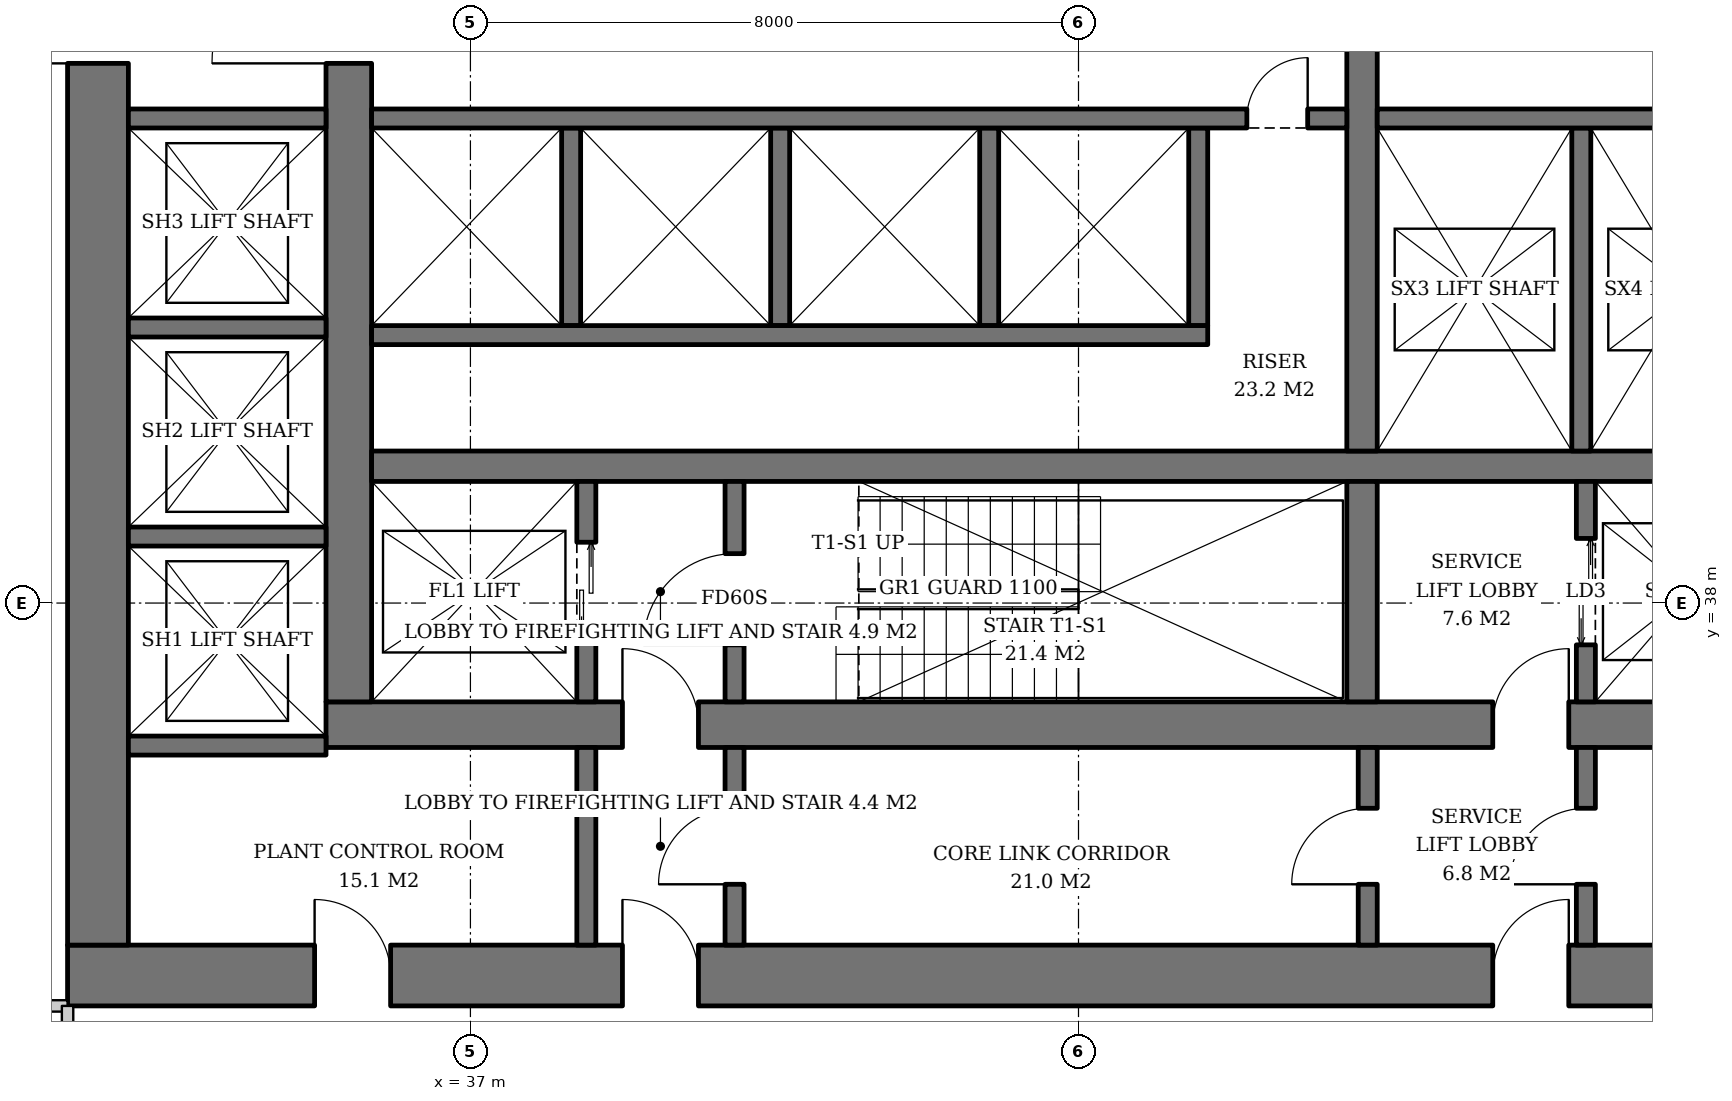
"""IFC4 building model, lengths in metres.
Left out: names, types, materials, properties, quantities, classifications, styles, units other than length and angle.
Written with IfcOpenShell. Run it as: python <this file> out.ifc"""

import sys

from ifc_helpers import new_model, si_unit, direction, frame, frame_2d, origin, place, context, subcontext, project, spatial, rectangle, extrude, element, fill, save


model = new_model("IFC4")
c1 = context("Model", 3, precision=1e-05, world=origin(), true_north=direction((0.0, 1.0)))
c2 = subcontext(c1, "Body", "Model", "MODEL_VIEW")
j1 = project(units=[si_unit("LENGTHUNIT", "METRE"), si_unit("PLANEANGLEUNIT", "RADIAN")], contexts=[c1])
p1 = place(None, origin())
s1 = spatial("IfcSite", under=j1, at=p1, CompositionType="ELEMENT")
p2 = place(p1, origin())
s2 = spatial("IfcBuilding", under=s1, at=p2, CompositionType="ELEMENT")
p3 = place(p2, frame((0.0, 0.0, 81.8)))
s3 = spatial("IfcBuildingStorey", under=s2, at=p3, CompositionType="ELEMENT", Elevation=81.8)
p4 = place(p3, frame((35.1, 36.4, 0.0), z_axis=(0.0, 0.0, 1.0), x_axis=(1.0, 0.0, 0.0)))
e1 = element("IfcWall", 1, at=p4, inside=s3, PredefinedType="SHEAR", context=c2, shape_type="SweptSolid", body=[
    extrude(rectangle(XDim=19.8, YDim=0.6, at=frame_2d((9.9, 0.0))), origin(), (0.0, 0.0, 1.0), 3.8),
])
p5 = place(p4, frame((3.9, 0.0, 0.0)))
e2 = element("IfcOpeningElement", 2, at=p5, cuts=e1, PredefinedType="OPENING", context=c2, shape_type="SweptSolid", body=[
    extrude(rectangle(XDim=1.0, YDim=2.1, at=frame_2d((0.5, 1.05))), frame((0.0, 0.31, 0.0), z_axis=(0.0, -1.0, 0.0), x_axis=(1.0, 0.0, 0.0)), (0.0, 0.0, 1.0), 0.62),
])
p6 = place(p4, frame((15.35, 0.0, 0.0)))
e3 = element("IfcOpeningElement", 3, at=p6, cuts=e1, PredefinedType="OPENING", context=c2, shape_type="SweptSolid", body=[
    extrude(rectangle(XDim=1.0, YDim=2.1, at=frame_2d((0.5, 1.05))), frame((0.0, 0.31, 0.0), z_axis=(0.0, -1.0, 0.0), x_axis=(1.0, 0.0, 0.0)), (0.0, 0.0, 1.0), 0.62),
])
p7 = place(p3, frame((35.4, 36.7, 0.0), z_axis=(0.0, 0.0, 1.0), x_axis=(0.0, 1.0, 0.0)))
e4 = element("IfcWall", 4, at=p7, inside=s3, PredefinedType="SHEAR", context=c2, shape_type="SweptSolid", body=[
    extrude(rectangle(XDim=18.6, YDim=0.6, at=frame_2d((9.3, 0.0))), origin(), (0.0, 0.0, 1.0), 3.8),
])
p8 = place(p7, frame((8.4, 0.0, 0.0)))
e5 = element("IfcOpeningElement", 5, at=p8, cuts=e4, PredefinedType="OPENING", context=c2, shape_type="SweptSolid", body=[
    extrude(rectangle(XDim=1.8, YDim=2.4, at=frame_2d((0.9, 1.2))), frame((0.0, 0.31, 0.0), z_axis=(0.0, -1.0, 0.0), x_axis=(1.0, 0.0, 0.0)), (0.0, 0.0, 1.0), 0.62),
])
p9 = place(p3, frame((31.7, 33.1, 0.0), z_axis=(0.0, 0.0, 1.0), x_axis=(1.0, 0.0, 0.0)))
e6 = element("IfcWall", 6, at=p9, inside=s3, PredefinedType="SHEAR", context=c2, shape_type="SweptSolid", body=[
    extrude(rectangle(XDim=26.6, YDim=0.8, at=frame_2d((13.3, 0.0))), origin(), (0.0, 0.0, 1.0), 3.8),
])
p10 = place(p9, frame((7.3, 0.0, 0.0)))
e7 = element("IfcOpeningElement", 7, at=p10, cuts=e6, PredefinedType="OPENING", context=c2, shape_type="SweptSolid", body=[
    extrude(rectangle(XDim=1.0, YDim=2.1, at=frame_2d((0.5, 1.05))), frame((0.0, 0.41, 0.0), z_axis=(0.0, -1.0, 0.0), x_axis=(1.0, 0.0, 0.0)), (0.0, 0.0, 1.0), 0.82),
])
p11 = place(p9, frame((18.75, 0.0, 0.0)))
e8 = element("IfcOpeningElement", 8, at=p11, cuts=e6, PredefinedType="OPENING", context=c2, shape_type="SweptSolid", body=[
    extrude(rectangle(XDim=1.0, YDim=2.1, at=frame_2d((0.5, 1.05))), frame((0.0, 0.41, 0.0), z_axis=(0.0, -1.0, 0.0), x_axis=(1.0, 0.0, 0.0)), (0.0, 0.0, 1.0), 0.82),
])
p12 = place(p9, frame((3.25, 0.0, 0.0)))
e9 = element("IfcOpeningElement", 9, at=p12, cuts=e6, PredefinedType="OPENING", context=c2, shape_type="SweptSolid", body=[
    extrude(rectangle(XDim=1.0, YDim=2.1, at=frame_2d((0.5, 1.05))), frame((0.0, 0.41, 0.0), z_axis=(0.0, -1.0, 0.0), x_axis=(1.0, 0.0, 0.0)), (0.0, 0.0, 1.0), 0.82),
])
p13 = place(p3, frame((32.1, 33.5, 0.0), z_axis=(0.0, 0.0, 1.0), x_axis=(0.0, 1.0, 0.0)))
e10 = element("IfcWall", 10, at=p13, inside=s3, PredefinedType="SHEAR", context=c2, shape_type="SweptSolid", body=[
    extrude(rectangle(XDim=25.0, YDim=0.8, at=frame_2d((12.5, 0.0))), origin(), (0.0, 0.0, 1.0), 3.8),
])
p14 = place(p13, frame((11.6, 0.0, 0.0)))
e11 = element("IfcOpeningElement", 11, at=p14, cuts=e10, PredefinedType="OPENING", context=c2, shape_type="SweptSolid", body=[
    extrude(rectangle(XDim=1.8, YDim=2.4, at=frame_2d((0.9, 1.2))), frame((0.0, 0.41, 0.0), z_axis=(0.0, -1.0, 0.0), x_axis=(1.0, 0.0, 0.0)), (0.0, 0.0, 1.0), 0.82),
])
p15 = place(p3, frame((35.7, 39.8, 0.0), z_axis=(0.0, 0.0, 1.0), x_axis=(1.0, 0.0, 0.0)))
e12 = element("IfcWall", 12, at=p15, inside=s3, PredefinedType="SHEAR", context=c2, shape_type="SweptSolid", body=[
    extrude(rectangle(XDim=18.6, YDim=0.4, at=frame_2d((9.3, 0.0))), origin(), (0.0, 0.0, 1.0), 3.8),
])
p16 = place(p3, frame((48.73, 36.7, 0.0), z_axis=(0.0, 0.0, 1.0), x_axis=(0.0, 1.0, 0.0)))
e13 = element("IfcWall", 13, at=p16, inside=s3, PredefinedType="SHEAR", context=c2, shape_type="SweptSolid", body=[
    extrude(rectangle(XDim=2.9, YDim=0.4, at=frame_2d((1.45, 0.0))), origin(), (0.0, 0.0, 1.0), 3.8),
])
p17 = place(p3, frame((48.73, 40.0, 0.0), z_axis=(0.0, 0.0, 1.0), x_axis=(0.0, 1.0, 0.0)))
e14 = element("IfcWall", 14, at=p17, inside=s3, PredefinedType="SHEAR", context=c2, shape_type="SweptSolid", body=[
    extrude(rectangle(XDim=12.0, YDim=0.4, at=frame_2d((6.0, 0.0))), origin(), (0.0, 0.0, 1.0), 3.8),
])
p18 = place(p17, frame((5.5, 0.0, 0.0)))
e15 = element("IfcOpeningElement", 15, at=p18, cuts=e14, PredefinedType="OPENING", context=c2, shape_type="SweptSolid", body=[
    extrude(rectangle(XDim=1.0, YDim=2.1, at=frame_2d((0.5, 1.05))), frame((0.0, 0.21, 0.0), z_axis=(0.0, -1.0, 0.0), x_axis=(1.0, 0.0, 0.0)), (0.0, 0.0, 1.0), 0.42),
])
p19 = place(p3, frame((38.525, 36.7, 0.0), z_axis=(0.0, 0.0, 1.0), x_axis=(0.0, 1.0, 0.0)))
e16 = element("IfcWall", 16, at=p19, inside=s3, PredefinedType="SHEAR", context=c2, shape_type="SweptSolid", body=[
    extrude(rectangle(XDim=2.9, YDim=0.25, at=frame_2d((1.45, 0.0))), origin(), (0.0, 0.0, 1.0), 3.8),
])
p20 = place(p19, frame((0.8, 0.0, 0.0)))
e17 = element("IfcOpeningElement", 17, at=p20, cuts=e16, PredefinedType="OPENING", context=c2, shape_type="SweptSolid", body=[
    extrude(rectangle(XDim=1.3, YDim=2.2, at=frame_2d((0.65, 1.1))), frame((0.0, 0.135, 0.0), z_axis=(0.0, -1.0, 0.0), x_axis=(1.0, 0.0, 0.0)), (0.0, 0.0, 1.0), 0.27),
])
p21 = place(p3, frame((40.475, 36.7, 0.0), z_axis=(0.0, 0.0, 1.0), x_axis=(0.0, 1.0, 0.0)))
e18 = element("IfcWall", 18, at=p21, inside=s3, PredefinedType="SHEAR", context=c2, shape_type="SweptSolid", body=[
    extrude(rectangle(XDim=2.9, YDim=0.25, at=frame_2d((1.45, 0.0))), origin(), (0.0, 0.0, 1.0), 3.8),
])
p22 = place(p21, frame((0.75, 0.0, 0.0)))
e19 = element("IfcOpeningElement", 19, at=p22, cuts=e18, PredefinedType="OPENING", context=c2, shape_type="SweptSolid", body=[
    extrude(rectangle(XDim=1.2, YDim=2.1, at=frame_2d((0.6, 1.05))), frame((0.0, 0.135, 0.0), z_axis=(0.0, -1.0, 0.0), x_axis=(1.0, 0.0, 0.0)), (0.0, 0.0, 1.0), 0.27),
])
p23 = place(p3, frame((51.675, 36.7, 0.0), z_axis=(0.0, 0.0, 1.0), x_axis=(0.0, 1.0, 0.0)))
e20 = element("IfcWall", 20, at=p23, inside=s3, PredefinedType="SHEAR", context=c2, shape_type="SweptSolid", body=[
    extrude(rectangle(XDim=2.9, YDim=0.25, at=frame_2d((1.45, 0.0))), origin(), (0.0, 0.0, 1.0), 3.8),
])
p24 = place(p23, frame((0.75, 0.0, 0.0)))
e21 = element("IfcOpeningElement", 21, at=p24, cuts=e20, PredefinedType="OPENING", context=c2, shape_type="SweptSolid", body=[
    extrude(rectangle(XDim=1.4, YDim=2.4, at=frame_2d((0.7, 1.2))), frame((0.0, 0.135, 0.0), z_axis=(0.0, -1.0, 0.0), x_axis=(1.0, 0.0, 0.0)), (0.0, 0.0, 1.0), 0.27),
])
for number, where, z_axis, x_axis in (
    (22, (38.325, 44.25, 0.0), (0.0, 0.0, 1.0), (0.0, -1.0, 0.0)),
    (23, (41.075, 44.25, 0.0), (0.0, 0.0, 1.0), (0.0, -1.0, 0.0)),
    (24, (43.825, 44.25, 0.0), (0.0, 0.0, 1.0), (0.0, -1.0, 0.0)),
    (25, (46.575, 44.25, 0.0), (0.0, 0.0, 1.0), (0.0, -1.0, 0.0)),
):
    element("IfcWall", number, at=place(p3, frame(where, z_axis=z_axis, x_axis=x_axis)), inside=s3, PredefinedType="SHEAR", context=c2, shape_type="SweptSolid", body=[
        extrude(rectangle(XDim=2.6, YDim=0.25, at=frame_2d((1.3, 0.0))), origin(), (0.0, 0.0, 1.0), 3.8),
    ])
p25 = place(p3, frame((35.7, 41.525, 0.0), z_axis=(0.0, 0.0, 1.0), x_axis=(1.0, 0.0, 0.0)))
e26 = element("IfcWall", 26, at=p25, inside=s3, PredefinedType="SHEAR", context=c2, shape_type="SweptSolid", body=[
    extrude(rectangle(XDim=11.0, YDim=0.25, at=frame_2d((5.5, 0.0))), origin(), (0.0, 0.0, 1.0), 3.8),
])
p26 = place(p3, frame((35.7, 44.375, 0.0), z_axis=(0.0, 0.0, 1.0), x_axis=(1.0, 0.0, 0.0)))
e27 = element("IfcWall", 27, at=p26, inside=s3, PredefinedType="SHEAR", context=c2, shape_type="SweptSolid", body=[
    extrude(rectangle(XDim=12.83, YDim=0.25, at=frame_2d((6.415, 0.0))), origin(), (0.0, 0.0, 1.0), 3.8),
])
p27 = place(p26, frame((11.515, 0.0, 0.0)))
e28 = element("IfcOpeningElement", 28, at=p27, cuts=e27, PredefinedType="OPENING", context=c2, shape_type="SweptSolid", body=[
    extrude(rectangle(XDim=0.8, YDim=2.0, at=frame_2d((0.4, 1.0))), frame((0.0, 0.135, 0.0), z_axis=(0.0, -1.0, 0.0), x_axis=(1.0, 0.0, 0.0)), (0.0, 0.0, 1.0), 0.27),
])
p28 = place(p3, frame((51.615, 44.25, 0.0), z_axis=(0.0, 0.0, 1.0), x_axis=(0.0, -1.0, 0.0)))
e29 = element("IfcWall", 29, at=p28, inside=s3, PredefinedType="SHEAR", context=c2, shape_type="SweptSolid", body=[
    extrude(rectangle(XDim=4.25, YDim=0.25, at=frame_2d((2.125, 0.0))), origin(), (0.0, 0.0, 1.0), 3.8),
])
p29 = place(p3, frame((48.93, 44.375, 0.0), z_axis=(0.0, 0.0, 1.0), x_axis=(1.0, 0.0, 0.0)))
e30 = element("IfcWall", 30, at=p29, inside=s3, PredefinedType="SHEAR", context=c2, shape_type="SweptSolid", body=[
    extrude(rectangle(XDim=5.37, YDim=0.25, at=frame_2d((2.685, 0.0))), origin(), (0.0, 0.0, 1.0), 3.8),
])
for number, where, z_axis, x_axis in (
    (31, (32.5, 36.125, 0.0), (0.0, 0.0, 1.0), (1.0, 0.0, 0.0)),
    (32, (32.5, 38.875, 0.0), (0.0, 0.0, 1.0), (1.0, 0.0, 0.0)),
    (33, (32.5, 41.625, 0.0), (0.0, 0.0, 1.0), (1.0, 0.0, 0.0)),
    (34, (32.5, 44.375, 0.0), (0.0, 0.0, 1.0), (1.0, 0.0, 0.0)),
):
    element("IfcWall", number, at=place(p3, frame(where, z_axis=z_axis, x_axis=x_axis)), inside=s3, PredefinedType="SHEAR", context=c2, shape_type="SweptSolid", body=[
        extrude(rectangle(XDim=2.6, YDim=0.25, at=frame_2d((1.3, 0.0))), origin(), (0.0, 0.0, 1.0), 3.8),
    ])
p30 = place(p3, frame((38.525, 33.5, 0.0), z_axis=(0.0, 0.0, 1.0), x_axis=(0.0, 1.0, 0.0)))
e35 = element("IfcWall", 35, at=p30, inside=s3, PredefinedType="SOLIDWALL", context=c2, shape_type="SweptSolid", body=[
    extrude(rectangle(XDim=2.6, YDim=0.25, at=frame_2d((1.3, 0.0))), origin(), (0.0, 0.0, 1.0), 3.52),
])
p31 = place(p3, frame((40.475, 33.5, 0.0), z_axis=(0.0, 0.0, 1.0), x_axis=(0.0, 1.0, 0.0)))
e36 = element("IfcWall", 36, at=p31, inside=s3, PredefinedType="SOLIDWALL", context=c2, shape_type="SweptSolid", body=[
    extrude(rectangle(XDim=2.6, YDim=0.25, at=frame_2d((1.3, 0.0))), origin(), (0.0, 0.0, 1.0), 3.52),
])
p32 = place(p31, frame((0.8, 0.0, 0.0)))
e37 = element("IfcOpeningElement", 37, at=p32, cuts=e36, PredefinedType="OPENING", context=c2, shape_type="SweptSolid", body=[
    extrude(rectangle(XDim=1.0, YDim=2.1, at=frame_2d((0.5, 1.05))), frame((0.0, 0.135, 0.0), z_axis=(0.0, -1.0, 0.0), x_axis=(1.0, 0.0, 0.0)), (0.0, 0.0, 1.0), 0.27),
])
p33 = place(p3, frame((48.805, 33.5, 0.0), z_axis=(0.0, 0.0, 1.0), x_axis=(0.0, 1.0, 0.0)))
e38 = element("IfcWall", 38, at=p33, inside=s3, PredefinedType="SOLIDWALL", context=c2, shape_type="SweptSolid", body=[
    extrude(rectangle(XDim=2.6, YDim=0.25, at=frame_2d((1.3, 0.0))), origin(), (0.0, 0.0, 1.0), 3.52),
])
p34 = place(p33, frame((0.8, 0.0, 0.0)))
e39 = element("IfcOpeningElement", 39, at=p34, cuts=e38, PredefinedType="OPENING", context=c2, shape_type="SweptSolid", body=[
    extrude(rectangle(XDim=1.0, YDim=2.1, at=frame_2d((0.5, 1.05))), frame((0.0, 0.135, 0.0), z_axis=(0.0, -1.0, 0.0), x_axis=(1.0, 0.0, 0.0)), (0.0, 0.0, 1.0), 0.27),
])
p35 = place(p3, frame((51.675, 33.5, 0.0), z_axis=(0.0, 0.0, 1.0), x_axis=(0.0, 1.0, 0.0)))
e40 = element("IfcWall", 40, at=p35, inside=s3, PredefinedType="SOLIDWALL", context=c2, shape_type="SweptSolid", body=[
    extrude(rectangle(XDim=2.6, YDim=0.25, at=frame_2d((1.3, 0.0))), origin(), (0.0, 0.0, 1.0), 3.52),
])
p36 = place(p35, frame((0.8, 0.0, 0.0)))
e41 = element("IfcOpeningElement", 41, at=p36, cuts=e40, PredefinedType="OPENING", context=c2, shape_type="SweptSolid", body=[
    extrude(rectangle(XDim=1.0, YDim=2.1, at=frame_2d((0.5, 1.05))), frame((0.0, 0.135, 0.0), z_axis=(0.0, -1.0, 0.0), x_axis=(1.0, 0.0, 0.0)), (0.0, 0.0, 1.0), 0.27),
])
p37 = place(p3, frame((31.7, 32.7, 0.0), z_axis=(0.0, 0.0, 1.0), x_axis=(-1.0, 0.0, 0.0)))
e42 = element("IfcWall", 42, at=p37, inside=s3, PredefinedType="PARTITIONING", context=c2, shape_type="SweptSolid", body=[
    extrude(rectangle(XDim=2.0, YDim=0.15, at=frame_2d((1.0, 0.0))), origin(), (0.0, 0.0, 1.0), 3.52),
])
p38 = place(p3, frame((31.7, 32.7, 0.0), z_axis=(0.0, 0.0, 1.0), x_axis=(0.0, -1.0, 0.0)))
e43 = element("IfcWall", 43, at=p38, inside=s3, PredefinedType="PARTITIONING", context=c2, shape_type="SweptSolid", body=[
    extrude(rectangle(XDim=2.0, YDim=0.15, at=frame_2d((1.0, 0.0))), origin(), (0.0, 0.0, 1.0), 2.512),
])
p39 = place(p20, origin())
e44 = element("IfcDoor", 44, at=p39, inside=s3, OperationType="DOUBLE_DOOR_SLIDING", PredefinedType="DOOR", context=c2, shape_type="SweptSolid", body=[
    extrude(rectangle(XDim=1.3, YDim=2.2, at=frame_2d((0.65, 1.1))), frame((0.0, 0.025, 0.0), z_axis=(0.0, -1.0, 0.0), x_axis=(1.0, 0.0, 0.0)), (0.0, 0.0, 1.0), 0.05),
])
fill(e17, e44)
p40 = place(p22, origin())
e45 = element("IfcDoor", 45, at=p40, inside=s3, OperationType="SINGLE_SWING_LEFT", PredefinedType="DOOR", context=c2, shape_type="SweptSolid", body=[
    extrude(rectangle(XDim=1.2, YDim=2.1, at=frame_2d((0.6, 1.05))), frame((0.0, 0.025, 0.0), z_axis=(0.0, -1.0, 0.0), x_axis=(1.0, 0.0, 0.0)), (0.0, 0.0, 1.0), 0.05),
])
fill(e19, e45)
p41 = place(p24, origin())
e46 = element("IfcDoor", 46, at=p41, inside=s3, OperationType="DOUBLE_DOOR_SLIDING", PredefinedType="DOOR", context=c2, shape_type="SweptSolid", body=[
    extrude(rectangle(XDim=1.4, YDim=2.4, at=frame_2d((0.7, 1.2))), frame((0.0, 0.025, 0.0), z_axis=(0.0, -1.0, 0.0), x_axis=(1.0, 0.0, 0.0)), (0.0, 0.0, 1.0), 0.05),
])
fill(e21, e46)
p42 = place(p27, origin())
e47 = element("IfcDoor", 47, at=p42, inside=s3, OperationType="SINGLE_SWING_RIGHT", PredefinedType="DOOR", context=c2, shape_type="SweptSolid", body=[
    extrude(rectangle(XDim=0.8, YDim=2.0, at=frame_2d((0.4, 1.0))), frame((0.0, 0.025, 0.0), z_axis=(0.0, -1.0, 0.0), x_axis=(1.0, 0.0, 0.0)), (0.0, 0.0, 1.0), 0.05),
])
fill(e28, e47)
p43 = place(p32, origin())
e48 = element("IfcDoor", 48, at=p43, inside=s3, OperationType="SINGLE_SWING_LEFT", PredefinedType="DOOR", context=c2, shape_type="SweptSolid", body=[
    extrude(rectangle(XDim=1.0, YDim=2.1, at=frame_2d((0.5, 1.05))), frame((0.0, 0.025, 0.0), z_axis=(0.0, -1.0, 0.0), x_axis=(1.0, 0.0, 0.0)), (0.0, 0.0, 1.0), 0.05),
])
fill(e37, e48)
p44 = place(p34, origin())
e49 = element("IfcDoor", 49, at=p44, inside=s3, OperationType="SINGLE_SWING_LEFT", PredefinedType="DOOR", context=c2, shape_type="SweptSolid", body=[
    extrude(rectangle(XDim=1.0, YDim=2.1, at=frame_2d((0.5, 1.05))), frame((0.0, 0.025, 0.0), z_axis=(0.0, -1.0, 0.0), x_axis=(1.0, 0.0, 0.0)), (0.0, 0.0, 1.0), 0.05),
])
fill(e39, e49)
p45 = place(p36, origin())
e50 = element("IfcDoor", 50, at=p45, inside=s3, OperationType="SINGLE_SWING_LEFT", PredefinedType="DOOR", context=c2, shape_type="SweptSolid", body=[
    extrude(rectangle(XDim=1.0, YDim=2.1, at=frame_2d((0.5, 1.05))), frame((0.0, 0.025, 0.0), z_axis=(0.0, -1.0, 0.0), x_axis=(1.0, 0.0, 0.0)), (0.0, 0.0, 1.0), 0.05),
])
fill(e41, e50)
p46 = place(p5, origin())
e51 = element("IfcDoor", 51, at=p46, inside=s3, OperationType="SINGLE_SWING_LEFT", PredefinedType="DOOR", context=c2, shape_type="SweptSolid", body=[
    extrude(rectangle(XDim=1.0, YDim=2.1, at=frame_2d((0.5, 1.05))), frame((0.0, 0.025, 0.0), z_axis=(0.0, -1.0, 0.0), x_axis=(1.0, 0.0, 0.0)), (0.0, 0.0, 1.0), 0.05),
])
fill(e2, e51)
p47 = place(p8, origin())
e52 = element("IfcDoor", 52, at=p47, inside=s3, OperationType="DOUBLE_DOOR_SINGLE_SWING", PredefinedType="DOOR", context=c2, shape_type="SweptSolid", body=[
    extrude(rectangle(XDim=1.8, YDim=2.4, at=frame_2d((0.9, 1.2))), frame((0.0, 0.025, 0.0), z_axis=(0.0, -1.0, 0.0), x_axis=(1.0, 0.0, 0.0)), (0.0, 0.0, 1.0), 0.05),
])
fill(e5, e52)
p48 = place(p6, origin())
e53 = element("IfcDoor", 53, at=p48, inside=s3, OperationType="SINGLE_SWING_RIGHT", PredefinedType="DOOR", context=c2, shape_type="SweptSolid", body=[
    extrude(rectangle(XDim=1.0, YDim=2.1, at=frame_2d((0.5, 1.05))), frame((0.0, 0.025, 0.0), z_axis=(0.0, -1.0, 0.0), x_axis=(1.0, 0.0, 0.0)), (0.0, 0.0, 1.0), 0.05),
])
fill(e3, e53)
p49 = place(p14, origin())
e54 = element("IfcDoor", 54, at=p49, inside=s3, OperationType="DOUBLE_DOOR_SINGLE_SWING", PredefinedType="DOOR", context=c2, shape_type="SweptSolid", body=[
    extrude(rectangle(XDim=1.8, YDim=2.4, at=frame_2d((0.9, 1.2))), frame((0.0, 0.025, 0.0), z_axis=(0.0, -1.0, 0.0), x_axis=(1.0, 0.0, 0.0)), (0.0, 0.0, 1.0), 0.05),
])
fill(e11, e54)
p50 = place(p10, origin())
e55 = element("IfcDoor", 55, at=p50, inside=s3, OperationType="SINGLE_SWING_LEFT", PredefinedType="DOOR", context=c2, shape_type="SweptSolid", body=[
    extrude(rectangle(XDim=1.0, YDim=2.1, at=frame_2d((0.5, 1.05))), frame((0.0, 0.025, 0.0), z_axis=(0.0, -1.0, 0.0), x_axis=(1.0, 0.0, 0.0)), (0.0, 0.0, 1.0), 0.05),
])
fill(e7, e55)
p51 = place(p11, origin())
e56 = element("IfcDoor", 56, at=p51, inside=s3, OperationType="SINGLE_SWING_RIGHT", PredefinedType="DOOR", context=c2, shape_type="SweptSolid", body=[
    extrude(rectangle(XDim=1.0, YDim=2.1, at=frame_2d((0.5, 1.05))), frame((0.0, 0.025, 0.0), z_axis=(0.0, -1.0, 0.0), x_axis=(1.0, 0.0, 0.0)), (0.0, 0.0, 1.0), 0.05),
])
fill(e8, e56)
p52 = place(p12, origin())
e57 = element("IfcDoor", 57, at=p52, inside=s3, OperationType="SINGLE_SWING_LEFT", PredefinedType="DOOR", context=c2, shape_type="SweptSolid", body=[
    extrude(rectangle(XDim=1.0, YDim=2.1, at=frame_2d((0.5, 1.05))), frame((0.0, 0.39, 0.0), z_axis=(0.0, -1.0, 0.0), x_axis=(1.0, 0.0, 0.0)), (0.0, 0.0, 1.0), 0.05),
])
fill(e9, e57)
save(model, sys.argv[1])
